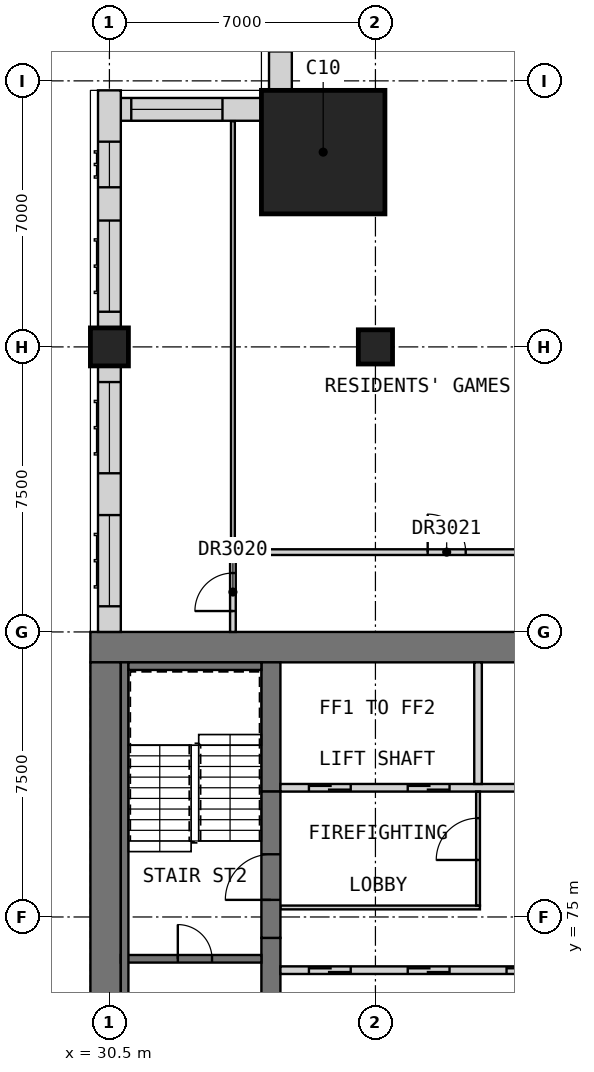
"""IFC4 building model, lengths in metres.
Left out: names, types, materials, properties, quantities, classifications, styles, units other than length and angle.
Written with IfcOpenShell. Run it as: python <this file> out.ifc"""

import sys

from ifc_helpers import new_model, si_unit, direction, frame, frame_2d, origin, origin_2d, place, context, subcontext, project, spatial, rectangle, extrude, element, fill, save


model = new_model("IFC4")
c1 = context("Model", 3, precision=1e-05, world=origin(), true_north=direction((0.0, 1.0)))
c2 = subcontext(c1, "Body", "Model", "MODEL_VIEW")
j1 = project(units=[si_unit("LENGTHUNIT", "METRE"), si_unit("PLANEANGLEUNIT", "RADIAN")], contexts=[c1])
p1 = place(None, origin())
s1 = spatial("IfcSite", under=j1, at=p1, CompositionType="ELEMENT")
p2 = place(p1, origin())
s2 = spatial("IfcBuilding", under=s1, at=p2, CompositionType="ELEMENT")
p3 = place(p2, frame((0.0, 0.0, 186.2)))
s3 = spatial("IfcBuildingStorey", under=s2, at=p3, CompositionType="ELEMENT", Elevation=186.2)
p4 = place(p3, frame((30.5, 90.0, 0.0), z_axis=(0.0, 0.0, 1.0), x_axis=(1.0, 0.0, 0.0)))
e1 = element("IfcColumn", 1, at=p4, inside=s3, PredefinedType="COLUMN", context=c2, shape_type="SweptSolid", body=[
    extrude(rectangle(XDim=1.0, YDim=1.0, at=origin_2d()), origin(), (0.0, 0.0, 1.0), 3.5),
])
p5 = place(p3, frame((37.5, 90.0, 0.0), z_axis=(0.0, 0.0, 1.0), x_axis=(1.0, 0.0, 0.0)))
e2 = element("IfcColumn", 2, at=p5, inside=s3, PredefinedType="COLUMN", context=c2, shape_type="SweptSolid", body=[
    extrude(rectangle(XDim=0.9, YDim=0.9, at=origin_2d()), origin(), (0.0, 0.0, 1.0), 3.5),
])
p6 = place(p3, frame((36.125, 95.125, 0.0), z_axis=(0.0, 0.0, 1.0), x_axis=(1.0, 0.0, 0.0)))
e3 = element("IfcColumn", 3, at=p6, inside=s3, PredefinedType="COLUMN", context=c2, shape_type="SweptSolid", body=[
    extrude(rectangle(XDim=3.25, YDim=3.25, at=origin_2d()), origin(), (0.0, 0.0, 1.0), 3.5),
])
p7 = place(p3, frame((30.0, 82.1, 0.0), z_axis=(0.0, 0.0, 1.0), x_axis=(1.0, 0.0, 0.0)))
e4 = element("IfcWall", 4, at=p7, inside=s3, PredefinedType="SHEAR", context=c2, shape_type="SweptSolid", body=[
    extrude(rectangle(XDim=30.0, YDim=0.8, at=frame_2d((15.0, 0.0))), origin(), (0.0, 0.0, 1.0), 3.5),
])
p8 = place(p3, frame((30.4, 60.8, 0.0), z_axis=(0.0, 0.0, 1.0), x_axis=(0.0, 1.0, 0.0)))
e5 = element("IfcWall", 5, at=p8, inside=s3, PredefinedType="SHEAR", context=c2, shape_type="SweptSolid", body=[
    extrude(rectangle(XDim=20.9, YDim=0.8, at=frame_2d((10.45, 0.0))), origin(), (0.0, 0.0, 1.0), 3.5),
])
p9 = place(p3, frame((34.75, 68.05, 0.0), z_axis=(0.0, 0.0, 1.0), x_axis=(0.0, 1.0, 0.0)))
e6 = element("IfcWall", 6, at=p9, inside=s3, PredefinedType="SHEAR", context=c2, shape_type="SweptSolid", body=[
    extrude(rectangle(XDim=6.4, YDim=0.5, at=frame_2d((3.2, 0.0))), origin(), (0.0, 0.0, 1.0), 3.5),
])
p10 = place(p3, frame((34.75, 78.3, 0.0), z_axis=(0.0, 0.0, 1.0), x_axis=(0.0, 1.0, 0.0)))
e7 = element("IfcWall", 7, at=p10, inside=s3, PredefinedType="SHEAR", context=c2, shape_type="SweptSolid", body=[
    extrude(rectangle(XDim=3.4, YDim=0.5, at=frame_2d((1.7, 0.0))), origin(), (0.0, 0.0, 1.0), 3.5),
])
p11 = place(p2, frame((0.0, 0.0, 34.0)))
s4 = spatial("IfcBuildingStorey", under=s2, at=p11, CompositionType="ELEMENT", Elevation=34.0)
for number, where, z_axis, x_axis in (
    (8, (29.7, 75.675, 0.0), (0.0, 0.0, 1.0), (0.0, 1.0, 0.0)),
    (9, (29.7, 80.55, 0.0), (0.0, 0.0, 1.0), (0.0, 1.0, 0.0)),
):
    element("IfcWall", number, at=place(p11, frame(where, z_axis=z_axis, x_axis=x_axis)), inside=s4, PredefinedType="SOLIDWALL", context=c2, shape_type="SweptSolid", body=[
        extrude(rectangle(XDim=0.9, YDim=0.6, at=frame_2d((0.45, 0.0))), origin(), (0.0, 0.0, 1.0), 286.2),
    ])
p12 = place(p3, frame((35.0, 100.45, 0.0), z_axis=(0.0, 0.0, 1.0), x_axis=(0.0, -1.0, 0.0)))
e10 = element("IfcWall", 10, at=p12, inside=s3, PredefinedType="SOLIDWALL", context=c2, shape_type="SweptSolid", body=[
    extrude(rectangle(XDim=3.7, YDim=0.6, at=frame_2d((1.85, 0.0))), origin(), (0.0, 0.0, 1.0), 3.25),
])
p13 = place(p12, frame((0.275, 0.0, 0.8)))
e11 = element("IfcOpeningElement", 11, at=p13, cuts=e10, PredefinedType="OPENING", context=c2, shape_type="SweptSolid", body=[
    extrude(rectangle(XDim=2.4, YDim=1.8, at=frame_2d((1.2, 0.9))), frame((0.0, 0.31, 0.0), z_axis=(0.0, -1.0, 0.0), x_axis=(1.0, 0.0, 0.0)), (0.0, 0.0, 1.0), 0.62),
])
p14 = place(p3, frame((34.5, 96.25, 0.0), z_axis=(0.0, 0.0, 1.0), x_axis=(-1.0, 0.0, 0.0)))
e12 = element("IfcWall", 12, at=p14, inside=s3, PredefinedType="SOLIDWALL", context=c2, shape_type="SweptSolid", body=[
    extrude(rectangle(XDim=3.7, YDim=0.6, at=frame_2d((1.85, 0.0))), origin(), (0.0, 0.0, 1.0), 3.25),
])
p15 = place(p14, frame((1.025, 0.0, 0.8)))
e13 = element("IfcOpeningElement", 13, at=p15, cuts=e12, PredefinedType="OPENING", context=c2, shape_type="SweptSolid", body=[
    extrude(rectangle(XDim=2.4, YDim=1.8, at=frame_2d((1.2, 0.9))), frame((0.0, 0.31, 0.0), z_axis=(0.0, -1.0, 0.0), x_axis=(1.0, 0.0, 0.0)), (0.0, 0.0, 1.0), 0.62),
])
p16 = place(p3, frame((30.5, 96.75, 0.0), z_axis=(0.0, 0.0, 1.0), x_axis=(0.0, -1.0, 0.0)))
e14 = element("IfcWall", 14, at=p16, inside=s3, PredefinedType="SOLIDWALL", context=c2, shape_type="SweptSolid", body=[
    extrude(rectangle(XDim=6.25, YDim=0.6, at=frame_2d((3.125, 0.0))), origin(), (0.0, 0.0, 1.0), 2.75),
])
p17 = place(p16, frame((3.425, 0.0, 0.8)))
e15 = element("IfcOpeningElement", 15, at=p17, cuts=e14, PredefinedType="OPENING", context=c2, shape_type="SweptSolid", body=[
    extrude(rectangle(XDim=2.4, YDim=1.8, at=frame_2d((1.2, 0.9))), frame((0.0, 0.31, 0.0), z_axis=(0.0, -1.0, 0.0), x_axis=(1.0, 0.0, 0.0)), (0.0, 0.0, 1.0), 0.62),
])
p18 = place(p16, frame((1.35, 0.0, 0.8)))
e16 = element("IfcOpeningElement", 16, at=p18, cuts=e14, PredefinedType="OPENING", context=c2, shape_type="SweptSolid", body=[
    extrude(rectangle(XDim=1.2, YDim=1.8, at=frame_2d((0.6, 0.9))), frame((0.0, 0.31, 0.0), z_axis=(0.0, -1.0, 0.0), x_axis=(1.0, 0.0, 0.0)), (0.0, 0.0, 1.0), 0.62),
])
p19 = place(p3, frame((30.5, 89.5, 0.0), z_axis=(0.0, 0.0, 1.0), x_axis=(0.0, -1.0, 0.0)))
e17 = element("IfcWall", 17, at=p19, inside=s3, PredefinedType="SOLIDWALL", context=c2, shape_type="SweptSolid", body=[
    extrude(rectangle(XDim=7.0, YDim=0.6, at=frame_2d((3.5, 0.0))), origin(), (0.0, 0.0, 1.0), 3.25),
])
p20 = place(p19, frame((3.925, 0.0, 0.8)))
e18 = element("IfcOpeningElement", 18, at=p20, cuts=e17, PredefinedType="OPENING", context=c2, shape_type="SweptSolid", body=[
    extrude(rectangle(XDim=2.4, YDim=1.8, at=frame_2d((1.2, 0.9))), frame((0.0, 0.31, 0.0), z_axis=(0.0, -1.0, 0.0), x_axis=(1.0, 0.0, 0.0)), (0.0, 0.0, 1.0), 0.62),
])
p21 = place(p19, frame((0.425, 0.0, 0.8)))
e19 = element("IfcOpeningElement", 19, at=p21, cuts=e17, PredefinedType="OPENING", context=c2, shape_type="SweptSolid", body=[
    extrude(rectangle(XDim=2.4, YDim=1.8, at=frame_2d((1.2, 0.9))), frame((0.0, 0.31, 0.0), z_axis=(0.0, -1.0, 0.0), x_axis=(1.0, 0.0, 0.0)), (0.0, 0.0, 1.0), 0.62),
])
p22 = place(p3, frame((35.0, 73.6, 0.0), z_axis=(0.0, 0.0, 1.0), x_axis=(1.0, 0.0, 0.0)))
e20 = element("IfcWall", 20, at=p22, inside=s3, PredefinedType="SOLIDWALL", context=c2, shape_type="SweptSolid", body=[
    extrude(rectangle(XDim=15.6, YDim=0.2, at=frame_2d((7.8, 0.0))), origin(), (0.0, 0.0, 1.0), 3.5),
])
p23 = place(p22, frame((0.75, 0.0, 0.0)))
e21 = element("IfcOpeningElement", 21, at=p23, cuts=e20, PredefinedType="OPENING", context=c2, shape_type="SweptSolid", body=[
    extrude(rectangle(XDim=1.1, YDim=2.1, at=frame_2d((0.55, 1.05))), frame((0.0, 0.11, 0.0), z_axis=(0.0, -1.0, 0.0), x_axis=(1.0, 0.0, 0.0)), (0.0, 0.0, 1.0), 0.22),
])
p24 = place(p22, frame((3.35, 0.0, 0.0)))
e22 = element("IfcOpeningElement", 22, at=p24, cuts=e20, PredefinedType="OPENING", context=c2, shape_type="SweptSolid", body=[
    extrude(rectangle(XDim=1.1, YDim=2.1, at=frame_2d((0.55, 1.05))), frame((0.0, 0.11, 0.0), z_axis=(0.0, -1.0, 0.0), x_axis=(1.0, 0.0, 0.0)), (0.0, 0.0, 1.0), 0.22),
])
p25 = place(p22, frame((5.95, 0.0, 0.0)))
e23 = element("IfcOpeningElement", 23, at=p25, cuts=e20, PredefinedType="OPENING", context=c2, shape_type="SweptSolid", body=[
    extrude(rectangle(XDim=1.1, YDim=2.1, at=frame_2d((0.55, 1.05))), frame((0.0, 0.11, 0.0), z_axis=(0.0, -1.0, 0.0), x_axis=(1.0, 0.0, 0.0)), (0.0, 0.0, 1.0), 0.22),
])
p26 = place(p22, frame((8.55, 0.0, 0.0)))
e24 = element("IfcOpeningElement", 24, at=p26, cuts=e20, PredefinedType="OPENING", context=c2, shape_type="SweptSolid", body=[
    extrude(rectangle(XDim=1.1, YDim=2.1, at=frame_2d((0.55, 1.05))), frame((0.0, 0.11, 0.0), z_axis=(0.0, -1.0, 0.0), x_axis=(1.0, 0.0, 0.0)), (0.0, 0.0, 1.0), 0.22),
])
p27 = place(p22, frame((11.15, 0.0, 0.0)))
e25 = element("IfcOpeningElement", 25, at=p27, cuts=e20, PredefinedType="OPENING", context=c2, shape_type="SweptSolid", body=[
    extrude(rectangle(XDim=1.1, YDim=2.1, at=frame_2d((0.55, 1.05))), frame((0.0, 0.11, 0.0), z_axis=(0.0, -1.0, 0.0), x_axis=(1.0, 0.0, 0.0)), (0.0, 0.0, 1.0), 0.22),
])
p28 = place(p22, frame((13.75, 0.0, 0.0)))
e26 = element("IfcOpeningElement", 26, at=p28, cuts=e20, PredefinedType="OPENING", context=c2, shape_type="SweptSolid", body=[
    extrude(rectangle(XDim=1.1, YDim=2.1, at=frame_2d((0.55, 1.05))), frame((0.0, 0.11, 0.0), z_axis=(0.0, -1.0, 0.0), x_axis=(1.0, 0.0, 0.0)), (0.0, 0.0, 1.0), 0.22),
])
p29 = place(p3, frame((35.0, 78.4, 0.0), z_axis=(0.0, 0.0, 1.0), x_axis=(1.0, 0.0, 0.0)))
e27 = element("IfcWall", 27, at=p29, inside=s3, PredefinedType="SOLIDWALL", context=c2, shape_type="SweptSolid", body=[
    extrude(rectangle(XDim=15.6, YDim=0.2, at=frame_2d((7.8, 0.0))), origin(), (0.0, 0.0, 1.0), 3.5),
])
p30 = place(p29, frame((0.75, 0.0, 0.0)))
e28 = element("IfcOpeningElement", 28, at=p30, cuts=e27, PredefinedType="OPENING", context=c2, shape_type="SweptSolid", body=[
    extrude(rectangle(XDim=1.1, YDim=2.1, at=frame_2d((0.55, 1.05))), frame((0.0, 0.11, 0.0), z_axis=(0.0, -1.0, 0.0), x_axis=(1.0, 0.0, 0.0)), (0.0, 0.0, 1.0), 0.22),
])
p31 = place(p29, frame((3.35, 0.0, 0.0)))
e29 = element("IfcOpeningElement", 29, at=p31, cuts=e27, PredefinedType="OPENING", context=c2, shape_type="SweptSolid", body=[
    extrude(rectangle(XDim=1.1, YDim=2.1, at=frame_2d((0.55, 1.05))), frame((0.0, 0.11, 0.0), z_axis=(0.0, -1.0, 0.0), x_axis=(1.0, 0.0, 0.0)), (0.0, 0.0, 1.0), 0.22),
])
p32 = place(p29, frame((11.15, 0.0, 0.0)))
e30 = element("IfcOpeningElement", 30, at=p32, cuts=e27, PredefinedType="OPENING", context=c2, shape_type="SweptSolid", body=[
    extrude(rectangle(XDim=1.1, YDim=2.1, at=frame_2d((0.55, 1.05))), frame((0.0, 0.11, 0.0), z_axis=(0.0, -1.0, 0.0), x_axis=(1.0, 0.0, 0.0)), (0.0, 0.0, 1.0), 0.22),
])
p33 = place(p29, frame((13.75, 0.0, 0.0)))
e31 = element("IfcOpeningElement", 31, at=p33, cuts=e27, PredefinedType="OPENING", context=c2, shape_type="SweptSolid", body=[
    extrude(rectangle(XDim=1.1, YDim=2.1, at=frame_2d((0.55, 1.05))), frame((0.0, 0.11, 0.0), z_axis=(0.0, -1.0, 0.0), x_axis=(1.0, 0.0, 0.0)), (0.0, 0.0, 1.0), 0.22),
])
p34 = place(p3, frame((40.2, 78.5, 0.0), z_axis=(0.0, 0.0, 1.0), x_axis=(0.0, 1.0, 0.0)))
e32 = element("IfcWall", 32, at=p34, inside=s3, PredefinedType="SOLIDWALL", context=c2, shape_type="SweptSolid", body=[
    extrude(rectangle(XDim=3.2, YDim=0.2, at=frame_2d((1.6, 0.0))), origin(), (0.0, 0.0, 1.0), 3.5),
])
p35 = place(p3, frame((35.0, 75.25, 0.0), z_axis=(0.0, 0.0, 1.0), x_axis=(1.0, 0.0, 0.0)))
e33 = element("IfcWall", 33, at=p35, inside=s3, PredefinedType="PARTITIONING", context=c2, shape_type="SweptSolid", body=[
    extrude(rectangle(XDim=5.25, YDim=0.1, at=frame_2d((2.625, 0.0))), origin(), (0.0, 0.0, 1.0), 3.25),
])
p36 = place(p3, frame((40.2, 75.3, 0.0), z_axis=(0.0, 0.0, 1.0), x_axis=(0.0, 1.0, 0.0)))
e34 = element("IfcWall", 34, at=p36, inside=s3, PredefinedType="PARTITIONING", context=c2, shape_type="SweptSolid", body=[
    extrude(rectangle(XDim=3.0, YDim=0.1, at=frame_2d((1.5, 0.0))), origin(), (0.0, 0.0, 1.0), 3.25),
])
p37 = place(p36, frame((1.2, 0.0, 0.0)))
e35 = element("IfcOpeningElement", 35, at=p37, cuts=e34, PredefinedType="OPENING", context=c2, shape_type="SweptSolid", body=[
    extrude(rectangle(XDim=1.1, YDim=2.1, at=frame_2d((0.55, 1.05))), frame((0.0, 0.06, 0.0), z_axis=(0.0, -1.0, 0.0), x_axis=(1.0, 0.0, 0.0)), (0.0, 0.0, 1.0), 0.12),
])
p38 = place(p3, frame((34.75, 74.45, 0.0), z_axis=(0.0, 0.0, 1.0), x_axis=(0.0, 1.0, 0.0)))
e36 = element("IfcWall", 36, at=p38, inside=s3, PredefinedType="SOLIDWALL", context=c2, shape_type="SweptSolid", body=[
    extrude(rectangle(XDim=3.85, YDim=0.5, at=frame_2d((1.925, 0.0))), origin(), (0.0, 0.0, 1.0), 2.3),
])
p39 = place(p38, frame((1.0, 0.0, 0.0)))
e37 = element("IfcOpeningElement", 37, at=p39, cuts=e36, PredefinedType="OPENING", context=c2, shape_type="SweptSolid", body=[
    extrude(rectangle(XDim=1.2, YDim=2.1, at=frame_2d((0.6, 1.05))), frame((0.0, 0.26, 0.0), z_axis=(0.0, -1.0, 0.0), x_axis=(1.0, 0.0, 0.0)), (0.0, 0.0, 1.0), 0.52),
])
p40 = place(p3, frame((30.8, 73.9, 0.0), z_axis=(0.0, 0.0, 1.0), x_axis=(1.0, 0.0, 0.0)))
e38 = element("IfcWall", 38, at=p40, inside=s3, PredefinedType="SOLIDWALL", context=c2, shape_type="SweptSolid", body=[
    extrude(rectangle(XDim=3.7, YDim=0.2, at=frame_2d((1.85, 0.0))), origin(), (0.0, 0.0, 1.0), 3.25),
])
p41 = place(p40, frame((1.5, 0.0, 0.0)))
e39 = element("IfcOpeningElement", 39, at=p41, cuts=e38, PredefinedType="OPENING", context=c2, shape_type="SweptSolid", body=[
    extrude(rectangle(XDim=0.9, YDim=2.1, at=frame_2d((0.45, 1.05))), frame((0.0, 0.11, 0.0), z_axis=(0.0, -1.0, 0.0), x_axis=(1.0, 0.0, 0.0)), (0.0, 0.0, 1.0), 0.22),
])
p42 = place(p3, frame((30.9, 60.8, 0.0), z_axis=(0.0, 0.0, 1.0), x_axis=(0.0, 1.0, 0.0)))
e40 = element("IfcWall", 40, at=p42, inside=s3, PredefinedType="SOLIDWALL", context=c2, shape_type="SweptSolid", body=[
    extrude(rectangle(XDim=20.9, YDim=0.2, at=frame_2d((10.45, 0.0))), origin(), (0.0, 0.0, 1.0), 3.25),
])
p43 = place(p3, frame((31.0, 81.6, 0.0), z_axis=(0.0, 0.0, 1.0), x_axis=(1.0, 0.0, 0.0)))
e41 = element("IfcWall", 41, at=p43, inside=s3, PredefinedType="SOLIDWALL", context=c2, shape_type="SweptSolid", body=[
    extrude(rectangle(XDim=3.5, YDim=0.2, at=frame_2d((1.75, 0.0))), origin(), (0.0, 0.0, 1.0), 3.25),
])
p44 = place(p3, frame((33.75, 84.6, 0.0), z_axis=(0.0, 0.0, 1.0), x_axis=(1.0, 0.0, 0.0)))
e42 = element("IfcWall", 42, at=p44, inside=s3, PredefinedType="PARTITIONING", context=c2, shape_type="SweptSolid", body=[
    extrude(rectangle(XDim=28.35, YDim=0.15, at=frame_2d((14.175, 0.0))), origin(), (0.0, 0.0, 1.0), 3.25),
])
p45 = place(p44, frame((5.125, 0.0, 0.0)))
e43 = element("IfcOpeningElement", 43, at=p45, cuts=e42, PredefinedType="OPENING", context=c2, shape_type="SweptSolid", body=[
    extrude(rectangle(XDim=1.0, YDim=2.1, at=frame_2d((0.5, 1.05))), frame((0.0, 0.085, 0.0), z_axis=(0.0, -1.0, 0.0), x_axis=(1.0, 0.0, 0.0)), (0.0, 0.0, 1.0), 0.17),
])
p46 = place(p44, frame((16.425, 0.0, 0.0)))
e44 = element("IfcOpeningElement", 44, at=p46, cuts=e42, PredefinedType="OPENING", context=c2, shape_type="SweptSolid", body=[
    extrude(rectangle(XDim=0.9, YDim=2.1, at=frame_2d((0.45, 1.05))), frame((0.0, 0.085, 0.0), z_axis=(0.0, -1.0, 0.0), x_axis=(1.0, 0.0, 0.0)), (0.0, 0.0, 1.0), 0.17),
])
p47 = place(p3, frame((33.75, 82.5, 0.0), z_axis=(0.0, 0.0, 1.0), x_axis=(0.0, 1.0, 0.0)))
e45 = element("IfcWall", 45, at=p47, inside=s3, PredefinedType="PARTITIONING", context=c2, shape_type="SweptSolid", body=[
    extrude(rectangle(XDim=2.025, YDim=0.15, at=frame_2d((1.012, 0.0))), origin(), (0.0, 0.0, 1.0), 3.25),
])
p48 = place(p47, frame((0.55, 0.0, 0.0)))
e46 = element("IfcOpeningElement", 46, at=p48, cuts=e45, PredefinedType="OPENING", context=c2, shape_type="SweptSolid", body=[
    extrude(rectangle(XDim=1.0, YDim=2.1, at=frame_2d((0.5, 1.05))), frame((0.0, 0.085, 0.0), z_axis=(0.0, -1.0, 0.0), x_axis=(1.0, 0.0, 0.0)), (0.0, 0.0, 1.0), 0.17),
])
p49 = place(p3, frame((33.75, 84.675, 0.0), z_axis=(0.0, 0.0, 1.0), x_axis=(0.0, 1.0, 0.0)))
e47 = element("IfcWall", 47, at=p49, inside=s3, PredefinedType="PARTITIONING", context=c2, shape_type="SweptSolid", body=[
    extrude(rectangle(XDim=11.265, YDim=0.1, at=frame_2d((5.632, 0.0))), origin(), (0.0, 0.0, 1.0), 3.25),
])
p50 = place(p15, origin())
e48 = element("IfcWindow", 48, at=p50, inside=s3, PartitioningType="SINGLE_PANEL", PredefinedType="WINDOW", context=c2, shape_type="SweptSolid", body=[
    extrude(rectangle(XDim=2.4, YDim=1.8, at=frame_2d((1.2, 0.9))), frame((0.0, -0.07, 0.0), z_axis=(0.0, -1.0, 0.0), x_axis=(1.0, 0.0, 0.0)), (0.0, 0.0, 1.0), 0.06),
])
fill(e13, e48)
p51 = place(p17, origin())
e49 = element("IfcWindow", 49, at=p51, inside=s3, PartitioningType="SINGLE_PANEL", PredefinedType="WINDOW", context=c2, shape_type="SweptSolid", body=[
    extrude(rectangle(XDim=2.4, YDim=1.8, at=frame_2d((1.2, 0.9))), frame((0.0, -0.07, 0.0), z_axis=(0.0, -1.0, 0.0), x_axis=(1.0, 0.0, 0.0)), (0.0, 0.0, 1.0), 0.06),
])
fill(e15, e49)
p52 = place(p18, origin())
e50 = element("IfcWindow", 50, at=p52, inside=s3, PartitioningType="SINGLE_PANEL", PredefinedType="WINDOW", context=c2, shape_type="SweptSolid", body=[
    extrude(rectangle(XDim=1.2, YDim=1.8, at=frame_2d((0.6, 0.9))), frame((0.0, -0.07, 0.0), z_axis=(0.0, -1.0, 0.0), x_axis=(1.0, 0.0, 0.0)), (0.0, 0.0, 1.0), 0.06),
])
fill(e16, e50)
p53 = place(p20, origin())
e51 = element("IfcWindow", 51, at=p53, inside=s3, PartitioningType="SINGLE_PANEL", PredefinedType="WINDOW", context=c2, shape_type="SweptSolid", body=[
    extrude(rectangle(XDim=2.4, YDim=1.8, at=frame_2d((1.2, 0.9))), frame((0.0, -0.07, 0.0), z_axis=(0.0, -1.0, 0.0), x_axis=(1.0, 0.0, 0.0)), (0.0, 0.0, 1.0), 0.06),
])
fill(e18, e51)
p54 = place(p21, origin())
e52 = element("IfcWindow", 52, at=p54, inside=s3, PartitioningType="SINGLE_PANEL", PredefinedType="WINDOW", context=c2, shape_type="SweptSolid", body=[
    extrude(rectangle(XDim=2.4, YDim=1.8, at=frame_2d((1.2, 0.9))), frame((0.0, -0.07, 0.0), z_axis=(0.0, -1.0, 0.0), x_axis=(1.0, 0.0, 0.0)), (0.0, 0.0, 1.0), 0.06),
])
fill(e19, e52)
p55 = place(p23, origin())
e53 = element("IfcDoor", 53, at=p55, inside=s3, OperationType="DOUBLE_DOOR_SLIDING", PredefinedType="DOOR", context=c2, shape_type="SweptSolid", body=[
    extrude(rectangle(XDim=1.1, YDim=2.1, at=frame_2d((0.55, 1.05))), frame((0.0, 0.025, 0.0), z_axis=(0.0, -1.0, 0.0), x_axis=(1.0, 0.0, 0.0)), (0.0, 0.0, 1.0), 0.05),
])
fill(e21, e53)
p56 = place(p24, origin())
e54 = element("IfcDoor", 54, at=p56, inside=s3, OperationType="DOUBLE_DOOR_SLIDING", PredefinedType="DOOR", context=c2, shape_type="SweptSolid", body=[
    extrude(rectangle(XDim=1.1, YDim=2.1, at=frame_2d((0.55, 1.05))), frame((0.0, 0.025, 0.0), z_axis=(0.0, -1.0, 0.0), x_axis=(1.0, 0.0, 0.0)), (0.0, 0.0, 1.0), 0.05),
])
fill(e22, e54)
p57 = place(p25, origin())
e55 = element("IfcDoor", 55, at=p57, inside=s3, OperationType="DOUBLE_DOOR_SLIDING", PredefinedType="DOOR", context=c2, shape_type="SweptSolid", body=[
    extrude(rectangle(XDim=1.1, YDim=2.1, at=frame_2d((0.55, 1.05))), frame((0.0, 0.025, 0.0), z_axis=(0.0, -1.0, 0.0), x_axis=(1.0, 0.0, 0.0)), (0.0, 0.0, 1.0), 0.05),
])
fill(e23, e55)
p58 = place(p30, origin())
e56 = element("IfcDoor", 56, at=p58, inside=s3, OperationType="DOUBLE_DOOR_SLIDING", PredefinedType="DOOR", context=c2, shape_type="SweptSolid", body=[
    extrude(rectangle(XDim=1.1, YDim=2.1, at=frame_2d((0.55, 1.05))), frame((0.0, 0.025, 0.0), z_axis=(0.0, -1.0, 0.0), x_axis=(1.0, 0.0, 0.0)), (0.0, 0.0, 1.0), 0.05),
])
fill(e28, e56)
p59 = place(p31, origin())
e57 = element("IfcDoor", 57, at=p59, inside=s3, OperationType="DOUBLE_DOOR_SLIDING", PredefinedType="DOOR", context=c2, shape_type="SweptSolid", body=[
    extrude(rectangle(XDim=1.1, YDim=2.1, at=frame_2d((0.55, 1.05))), frame((0.0, 0.025, 0.0), z_axis=(0.0, -1.0, 0.0), x_axis=(1.0, 0.0, 0.0)), (0.0, 0.0, 1.0), 0.05),
])
fill(e29, e57)
p60 = place(p37, origin())
e58 = element("IfcDoor", 58, at=p60, inside=s3, OperationType="SINGLE_SWING_LEFT", PredefinedType="DOOR", context=c2, shape_type="SweptSolid", body=[
    extrude(rectangle(XDim=1.1, YDim=2.1, at=frame_2d((0.55, 1.05))), frame((0.0, 0.025, 0.0), z_axis=(0.0, -1.0, 0.0), x_axis=(1.0, 0.0, 0.0)), (0.0, 0.0, 1.0), 0.05),
])
fill(e35, e58)
p61 = place(p39, origin())
e59 = element("IfcDoor", 59, at=p61, inside=s3, OperationType="SINGLE_SWING_RIGHT", PredefinedType="DOOR", context=c2, shape_type="SweptSolid", body=[
    extrude(rectangle(XDim=1.2, YDim=2.1, at=frame_2d((0.6, 1.05))), frame((0.0, 0.025, 0.0), z_axis=(0.0, -1.0, 0.0), x_axis=(1.0, 0.0, 0.0)), (0.0, 0.0, 1.0), 0.05),
])
fill(e37, e59)
p62 = place(p41, origin())
e60 = element("IfcDoor", 60, at=p62, inside=s3, OperationType="SINGLE_SWING_RIGHT", PredefinedType="DOOR", context=c2, shape_type="SweptSolid", body=[
    extrude(rectangle(XDim=0.9, YDim=2.1, at=frame_2d((0.45, 1.05))), frame((0.0, 0.025, 0.0), z_axis=(0.0, -1.0, 0.0), x_axis=(1.0, 0.0, 0.0)), (0.0, 0.0, 1.0), 0.05),
])
fill(e39, e60)
p63 = place(p48, origin())
e61 = element("IfcDoor", 61, at=p63, inside=s3, OperationType="SINGLE_SWING_LEFT", PredefinedType="DOOR", context=c2, shape_type="SweptSolid", body=[
    extrude(rectangle(XDim=1.0, YDim=2.1, at=frame_2d((0.5, 1.05))), frame((0.0, 0.025, 0.0), z_axis=(0.0, -1.0, 0.0), x_axis=(1.0, 0.0, 0.0)), (0.0, 0.0, 1.0), 0.05),
])
fill(e46, e61)
p64 = place(p45, origin())
e62 = element("IfcDoor", 62, at=p64, inside=s3, OperationType="SINGLE_SWING_LEFT", PredefinedType="DOOR", context=c2, shape_type="SweptSolid", body=[
    extrude(rectangle(XDim=1.0, YDim=2.1, at=frame_2d((0.5, 1.05))), frame((0.0, 0.025, 0.0), z_axis=(0.0, -1.0, 0.0), x_axis=(1.0, 0.0, 0.0)), (0.0, 0.0, 1.0), 0.05),
])
fill(e43, e62)
save(model, sys.argv[1])
